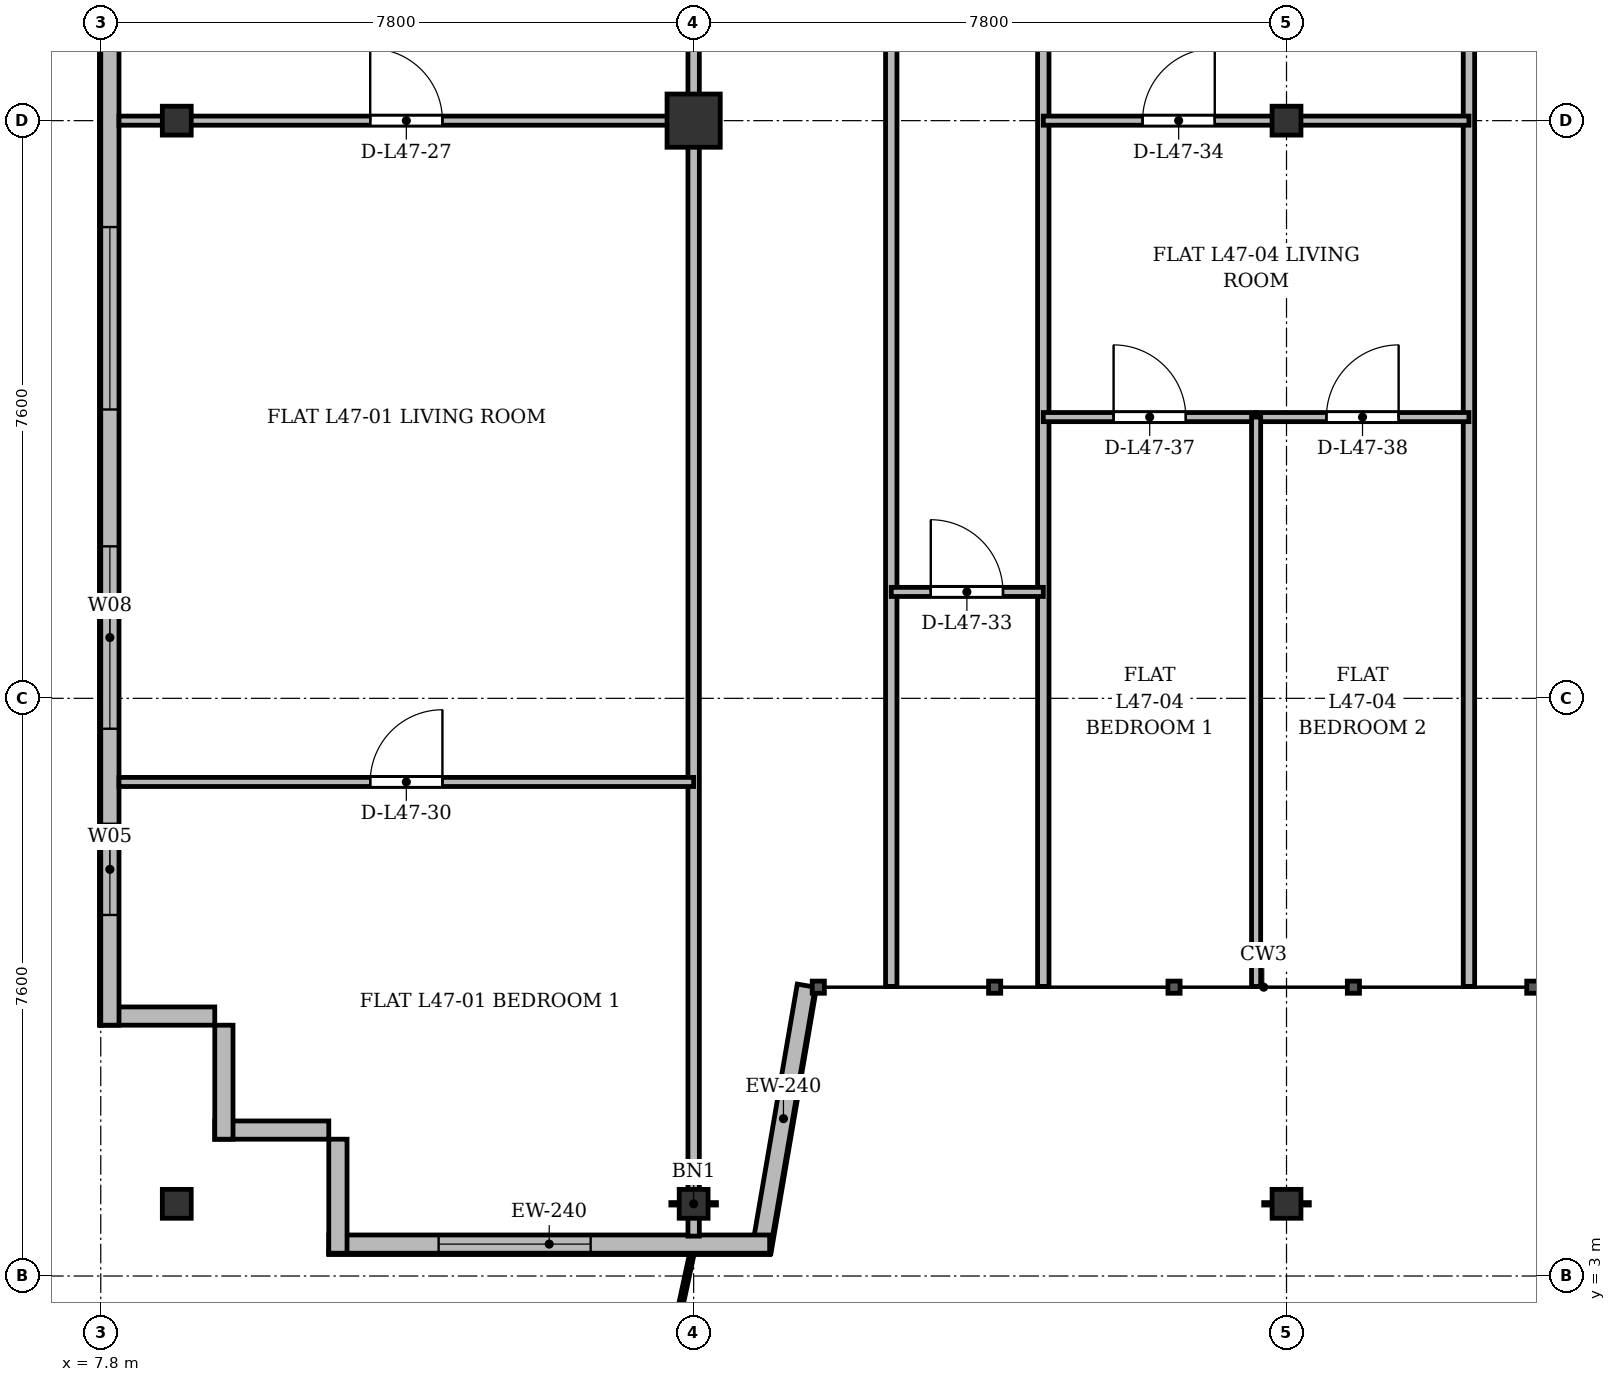
"""IFC4 building model, lengths in metres.
Left out: names, types, materials, properties, quantities, classifications, styles, units other than length and angle.
Written with IfcOpenShell. Run it as: python <this file> out.ifc"""

import sys

from ifc_helpers import new_model, si_unit, direction, frame, frame_2d, origin, origin_2d, place, context, subcontext, project, spatial, rectangle, i_section, extrude, source, transform, mapped, element, fill, save


model = new_model("IFC4")
c1 = context("Model", 3, precision=1e-05, world=origin(), true_north=direction((0.0, 1.0)))
c2 = subcontext(c1, "Body", "Model", "MODEL_VIEW")
j1 = project(units=[si_unit("LENGTHUNIT", "METRE"), si_unit("PLANEANGLEUNIT", "RADIAN")], contexts=[c1])
p1 = place(None, origin())
s1 = spatial("IfcSite", under=j1, at=p1, CompositionType="ELEMENT")
p2 = place(p1, origin())
s2 = spatial("IfcBuilding", under=s1, at=p2, CompositionType="ELEMENT")
p3 = place(p2, frame((0.0, 0.0, 178.9)))
s3 = spatial("IfcBuildingStorey", under=s2, at=p3, CompositionType="ELEMENT", Elevation=178.9)
m1 = source(origin(), c2, "Body", "SweptSolid", [
    extrude(i_section(OverallWidth=0.38, OverallDepth=0.38, WebThickness=0.02, FlangeThickness=0.03, at=origin_2d()), origin(), (0.0, 0.0, 1.0), 3.6),
])
for number, where, z_axis, x_axis in (
    (1, (8.8, 3.95, 0.0), (0.0, 0.0, 1.0), (1.0, 0.0, 0.0)),
    (2, (8.8, 18.2, 0.0), (0.0, 0.0, 1.0), (1.0, 0.0, 0.0)),
    (3, (15.6, 3.95, 0.0), (0.0, 0.0, 1.0), (1.0, 0.0, 0.0)),
):
    element("IfcColumn", number, at=place(p3, frame(where, z_axis=z_axis, x_axis=x_axis)), inside=s3, PredefinedType="COLUMN", context=c2, shape_type="MappedRepresentation", body=[
        mapped(m1, transform((0.0, 0.0, 0.0), x_axis=(1.0, 0.0, 0.0), y_axis=(0.0, 1.0, 0.0), z_axis=(0.0, 0.0, 1.0), scale=1.0)),
    ])
m2 = source(origin(), c2, "Body", "SweptSolid", [
    extrude(rectangle(XDim=0.7, YDim=0.7, at=origin_2d()), origin(), (0.0, 0.0, 1.0), 3.6),
])
p4 = place(p3, frame((15.6, 18.2, 0.0), z_axis=(0.0, 0.0, 1.0), x_axis=(1.0, 0.0, 0.0)))
e4 = element("IfcColumn", 4, at=p4, inside=s3, PredefinedType="COLUMN", context=c2, shape_type="MappedRepresentation", body=[
    mapped(m2, transform((0.0, 0.0, 0.0), x_axis=(1.0, 0.0, 0.0), y_axis=(0.0, 1.0, 0.0), z_axis=(0.0, 0.0, 1.0), scale=1.0)),
])
for number, where, z_axis, x_axis in (
    (5, (23.4, 3.95, 0.0), (0.0, 0.0, 1.0), (1.0, 0.0, 0.0)),
    (6, (23.4, 18.2, 0.0), (0.0, 0.0, 1.0), (1.0, 0.0, 0.0)),
):
    element("IfcColumn", number, at=place(p3, frame(where, z_axis=z_axis, x_axis=x_axis)), inside=s3, PredefinedType="COLUMN", context=c2, shape_type="MappedRepresentation", body=[
        mapped(m1, transform((0.0, 0.0, 0.0), x_axis=(1.0, 0.0, 0.0), y_axis=(0.0, 1.0, 0.0), z_axis=(0.0, 0.0, 1.0), scale=1.0)),
    ])
for number, where, z_axis, x_axis in (
    (7, (10.8, 4.92, 0.0), (0.0, 0.0, 1.0), (-1.0, 0.0, 0.0)),
    (8, (9.42, 4.8, 0.0), (0.0, 0.0, 1.0), (0.0, 1.0, 0.0)),
):
    element("IfcWall", number, at=place(p3, frame(where, z_axis=z_axis, x_axis=x_axis)), inside=s3, PredefinedType="SOLIDWALL", context=c2, shape_type="SweptSolid", body=[
        extrude(rectangle(XDim=1.5, YDim=0.24, at=frame_2d((0.75, 0.0))), origin(), (0.0, 0.0, 1.0), 3.22),
    ])
p5 = place(p3, frame((9.3, 6.42, 0.0), z_axis=(0.0, 0.0, 1.0), x_axis=(-1.0, 0.0, 0.0)))
e9 = element("IfcWall", 9, at=p5, inside=s3, PredefinedType="SOLIDWALL", context=c2, shape_type="SweptSolid", body=[
    extrude(rectangle(XDim=1.5, YDim=0.24, at=frame_2d((0.75, 0.0))), origin(), (0.0, 0.0, 1.0), 2.72),
])
p6 = place(p3, frame((7.92, 6.3, 0.0), z_axis=(0.0, 0.0, 1.0), x_axis=(0.0, 1.0, 0.0)))
e10 = element("IfcWall", 10, at=p6, inside=s3, PredefinedType="SOLIDWALL", context=c2, shape_type="SweptSolid", body=[
    extrude(rectangle(XDim=39.2, YDim=0.24, at=frame_2d((19.6, 0.0))), origin(), (0.0, 0.0, 1.0), 3.22),
])
p7 = place(p6, frame((1.45, 0.0, 0.92)))
e11 = element("IfcOpeningElement", 11, at=p7, cuts=e10, PredefinedType="OPENING", context=c2, shape_type="SweptSolid", body=[
    extrude(rectangle(XDim=1.2, YDim=1.65, at=frame_2d((0.6, 0.825))), frame((0.0, 0.13, 0.0), z_axis=(0.0, -1.0, 0.0), x_axis=(1.0, 0.0, 0.0)), (0.0, 0.0, 1.0), 0.26),
])
p8 = place(p6, frame((3.9, 0.0, 0.92)))
e12 = element("IfcOpeningElement", 12, at=p8, cuts=e10, PredefinedType="OPENING", context=c2, shape_type="SweptSolid", body=[
    extrude(rectangle(XDim=2.4, YDim=2.1, at=frame_2d((1.2, 1.05))), frame((0.0, 0.13, 0.0), z_axis=(0.0, -1.0, 0.0), x_axis=(1.0, 0.0, 0.0)), (0.0, 0.0, 1.0), 0.26),
])
p9 = place(p6, frame((8.1, 0.0, 0.92)))
e13 = element("IfcOpeningElement", 13, at=p9, cuts=e10, PredefinedType="OPENING", context=c2, shape_type="SweptSolid", body=[
    extrude(rectangle(XDim=2.4, YDim=2.1, at=frame_2d((1.2, 1.05))), frame((0.0, 0.13, 0.0), z_axis=(0.0, -1.0, 0.0), x_axis=(1.0, 0.0, 0.0)), (0.0, 0.0, 1.0), 0.26),
])
p10 = place(p6, frame((15.3, 0.0, 0.92)))
e14 = element("IfcOpeningElement", 14, at=p10, cuts=e10, PredefinedType="OPENING", context=c2, shape_type="SweptSolid", body=[
    extrude(rectangle(XDim=2.4, YDim=2.1, at=frame_2d((1.2, 1.05))), frame((0.0, 0.13, 0.0), z_axis=(0.0, -1.0, 0.0), x_axis=(1.0, 0.0, 0.0)), (0.0, 0.0, 1.0), 0.26),
])
p11 = place(p6, frame((33.5, 0.0, 0.92)))
e15 = element("IfcOpeningElement", 15, at=p11, cuts=e10, PredefinedType="OPENING", context=c2, shape_type="SweptSolid", body=[
    extrude(rectangle(XDim=1.2, YDim=1.65, at=frame_2d((0.6, 0.825))), frame((0.0, 0.13, 0.0), z_axis=(0.0, -1.0, 0.0), x_axis=(1.0, 0.0, 0.0)), (0.0, 0.0, 1.0), 0.26),
])
p12 = place(p6, frame((36.85, 0.0, 0.92)))
e16 = element("IfcOpeningElement", 16, at=p12, cuts=e10, PredefinedType="OPENING", context=c2, shape_type="SweptSolid", body=[
    extrude(rectangle(XDim=1.2, YDim=1.65, at=frame_2d((0.6, 0.825))), frame((0.0, 0.13, 0.0), z_axis=(0.0, -1.0, 0.0), x_axis=(1.0, 0.0, 0.0)), (0.0, 0.0, 1.0), 0.26),
])
p13 = place(p3, frame((17.082, 6.82, 0.0), z_axis=(0.0, 0.0, 1.0), x_axis=(-0.168990530437, -0.98561767467, 0.0)))
e17 = element("IfcWall", 17, at=p13, inside=s3, PredefinedType="SOLIDWALL", context=c2, shape_type="SweptSolid", body=[
    extrude(rectangle(XDim=3.551, YDim=0.24, at=frame_2d((1.775, 0.0))), origin(), (0.0, 0.0, 1.0), 2.62),
])
p14 = place(p3, frame((16.6, 3.42, 0.0), z_axis=(0.0, 0.0, 1.0), x_axis=(-1.0, 0.0, 0.0)))
e18 = element("IfcWall", 18, at=p14, inside=s3, PredefinedType="SOLIDWALL", context=c2, shape_type="SweptSolid", body=[
    extrude(rectangle(XDim=5.8, YDim=0.24, at=frame_2d((2.9, 0.0))), origin(), (0.0, 0.0, 1.0), 3.22),
])
p15 = place(p14, frame((2.355, 0.0, 0.9)))
e19 = element("IfcOpeningElement", 19, at=p15, cuts=e18, PredefinedType="OPENING", context=c2, shape_type="SweptSolid", body=[
    extrude(rectangle(XDim=2.0, YDim=1.95, at=frame_2d((1.0, 0.975))), frame((0.0, 0.13, 0.0), z_axis=(0.0, -1.0, 0.0), x_axis=(1.0, 0.0, 0.0)), (0.0, 0.0, 1.0), 0.26),
])
p16 = place(p3, frame((10.92, 3.3, 0.0), z_axis=(0.0, 0.0, 1.0), x_axis=(0.0, 1.0, 0.0)))
e20 = element("IfcWall", 20, at=p16, inside=s3, PredefinedType="SOLIDWALL", context=c2, shape_type="SweptSolid", body=[
    extrude(rectangle(XDim=1.5, YDim=0.24, at=frame_2d((0.75, 0.0))), origin(), (0.0, 0.0, 1.0), 2.62),
])
p17 = place(p3, frame((15.6, 3.525, 0.0), z_axis=(0.0, 0.0, 1.0), x_axis=(0.0, 1.0, 0.0)))
e21 = element("IfcWall", 21, at=p17, inside=s3, PredefinedType="PARTITIONING", context=c2, shape_type="SweptSolid", body=[
    extrude(rectangle(XDim=27.275, YDim=0.15, at=frame_2d((13.638, 0.0))), origin(), (0.0, 0.0, 1.0), 2.72),
])
p18 = place(p3, frame((25.8, 6.81, 0.0), z_axis=(0.0, 0.0, 1.0), x_axis=(0.0, 1.0, 0.0)))
e22 = element("IfcWall", 22, at=p18, inside=s3, PredefinedType="PARTITIONING", context=c2, shape_type="SweptSolid", body=[
    extrude(rectangle(XDim=23.99, YDim=0.15, at=frame_2d((11.995, 0.0))), origin(), (0.0, 0.0, 1.0), 2.62),
])
p19 = place(p3, frame((8.04, 18.2, 0.0), z_axis=(0.0, 0.0, 1.0), x_axis=(1.0, 0.0, 0.0)))
e23 = element("IfcWall", 23, at=p19, inside=s3, PredefinedType="PARTITIONING", context=c2, shape_type="SweptSolid", body=[
    extrude(rectangle(XDim=7.56, YDim=0.12, at=frame_2d((3.78, 0.0))), origin(), (0.0, 0.0, 1.0), 2.62),
])
p20 = place(p19, frame((3.305, 0.0, 0.0)))
e24 = element("IfcOpeningElement", 24, at=p20, cuts=e23, PredefinedType="OPENING", context=c2, shape_type="SweptSolid", body=[
    extrude(rectangle(XDim=0.95, YDim=2.15, at=frame_2d((0.475, 1.075))), frame((0.0, 0.07, 0.0), z_axis=(0.0, -1.0, 0.0), x_axis=(1.0, 0.0, 0.0)), (0.0, 0.0, 1.0), 0.14),
])
p21 = place(p3, frame((8.04, 9.5, 0.0), z_axis=(0.0, 0.0, 1.0), x_axis=(1.0, 0.0, 0.0)))
e25 = element("IfcWall", 25, at=p21, inside=s3, PredefinedType="PARTITIONING", context=c2, shape_type="SweptSolid", body=[
    extrude(rectangle(XDim=7.56, YDim=0.12, at=frame_2d((3.78, 0.0))), origin(), (0.0, 0.0, 1.0), 2.72),
])
p22 = place(p21, frame((3.305, 0.0, 0.0)))
e26 = element("IfcOpeningElement", 26, at=p22, cuts=e25, PredefinedType="OPENING", context=c2, shape_type="SweptSolid", body=[
    extrude(rectangle(XDim=0.95, YDim=2.15, at=frame_2d((0.475, 1.075))), frame((0.0, 0.07, 0.0), z_axis=(0.0, -1.0, 0.0), x_axis=(1.0, 0.0, 0.0)), (0.0, 0.0, 1.0), 0.14),
])
for number, where, z_axis, x_axis in (
    (27, (18.2, 6.81, 0.0), (0.0, 0.0, 1.0), (0.0, 1.0, 0.0)),
    (28, (20.2, 6.81, 0.0), (0.0, 0.0, 1.0), (0.0, 1.0, 0.0)),
):
    element("IfcWall", number, at=place(p3, frame(where, z_axis=z_axis, x_axis=x_axis)), inside=s3, PredefinedType="PARTITIONING", context=c2, shape_type="SweptSolid", body=[
        extrude(rectangle(XDim=23.99, YDim=0.15, at=frame_2d((11.995, 0.0))), origin(), (0.0, 0.0, 1.0), 2.62),
    ])
p23 = place(p3, frame((18.2, 12.0, 0.0), z_axis=(0.0, 0.0, 1.0), x_axis=(1.0, 0.0, 0.0)))
e29 = element("IfcWall", 29, at=p23, inside=s3, PredefinedType="PARTITIONING", context=c2, shape_type="SweptSolid", body=[
    extrude(rectangle(XDim=2.0, YDim=0.12, at=frame_2d((1.0, 0.0))), origin(), (0.0, 0.0, 1.0), 3.22),
])
p24 = place(p23, frame((0.52, 0.0, 0.0)))
e30 = element("IfcOpeningElement", 30, at=p24, cuts=e29, PredefinedType="OPENING", context=c2, shape_type="SweptSolid", body=[
    extrude(rectangle(XDim=0.95, YDim=2.15, at=frame_2d((0.475, 1.075))), frame((0.0, 0.07, 0.0), z_axis=(0.0, -1.0, 0.0), x_axis=(1.0, 0.0, 0.0)), (0.0, 0.0, 1.0), 0.14),
])
p25 = place(p3, frame((20.2, 18.2, 0.0), z_axis=(0.0, 0.0, 1.0), x_axis=(1.0, 0.0, 0.0)))
e31 = element("IfcWall", 31, at=p25, inside=s3, PredefinedType="PARTITIONING", context=c2, shape_type="SweptSolid", body=[
    extrude(rectangle(XDim=5.6, YDim=0.12, at=frame_2d((2.8, 0.0))), origin(), (0.0, 0.0, 1.0), 2.62),
])
p26 = place(p25, frame((1.306, 0.0, 0.0)))
e32 = element("IfcOpeningElement", 32, at=p26, cuts=e31, PredefinedType="OPENING", context=c2, shape_type="SweptSolid", body=[
    extrude(rectangle(XDim=0.95, YDim=2.15, at=frame_2d((0.475, 1.075))), frame((0.0, 0.07, 0.0), z_axis=(0.0, -1.0, 0.0), x_axis=(1.0, 0.0, 0.0)), (0.0, 0.0, 1.0), 0.14),
])
p27 = place(p3, frame((20.2, 14.3, 0.0), z_axis=(0.0, 0.0, 1.0), x_axis=(1.0, 0.0, 0.0)))
e33 = element("IfcWall", 33, at=p27, inside=s3, PredefinedType="PARTITIONING", context=c2, shape_type="SweptSolid", body=[
    extrude(rectangle(XDim=2.8, YDim=0.12, at=frame_2d((1.4, 0.0))), origin(), (0.0, 0.0, 1.0), 3.22),
])
p28 = place(p27, frame((0.925, 0.0, 0.0)))
e34 = element("IfcOpeningElement", 34, at=p28, cuts=e33, PredefinedType="OPENING", context=c2, shape_type="SweptSolid", body=[
    extrude(rectangle(XDim=0.95, YDim=2.15, at=frame_2d((0.475, 1.075))), frame((0.0, 0.07, 0.0), z_axis=(0.0, -1.0, 0.0), x_axis=(1.0, 0.0, 0.0)), (0.0, 0.0, 1.0), 0.14),
])
p29 = place(p3, frame((23.0, 14.3, 0.0), z_axis=(0.0, 0.0, 1.0), x_axis=(1.0, 0.0, 0.0)))
e35 = element("IfcWall", 35, at=p29, inside=s3, PredefinedType="PARTITIONING", context=c2, shape_type="SweptSolid", body=[
    extrude(rectangle(XDim=2.8, YDim=0.12, at=frame_2d((1.4, 0.0))), origin(), (0.0, 0.0, 1.0), 2.72),
])
p30 = place(p29, frame((0.925, 0.0, 0.0)))
e36 = element("IfcOpeningElement", 36, at=p30, cuts=e35, PredefinedType="OPENING", context=c2, shape_type="SweptSolid", body=[
    extrude(rectangle(XDim=0.95, YDim=2.15, at=frame_2d((0.475, 1.075))), frame((0.0, 0.07, 0.0), z_axis=(0.0, -1.0, 0.0), x_axis=(1.0, 0.0, 0.0)), (0.0, 0.0, 1.0), 0.14),
])
p31 = place(p3, frame((23.0, 6.81, 0.0), z_axis=(0.0, 0.0, 1.0), x_axis=(0.0, 1.0, 0.0)))
e37 = element("IfcWall", 37, at=p31, inside=s3, PredefinedType="PARTITIONING", context=c2, shape_type="SweptSolid", body=[
    extrude(rectangle(XDim=7.49, YDim=0.12, at=frame_2d((3.745, 0.0))), origin(), (0.0, 0.0, 1.0), 3.22),
])
m3 = source(origin(), c2, "Body", "SweptSolid", [
    extrude(rectangle(XDim=1.2, YDim=1.65, at=frame_2d((0.6, 0.825))), frame((0.0, 0.03, 0.0), z_axis=(0.0, -1.0, 0.0), x_axis=(1.0, 0.0, 0.0)), (0.0, 0.0, 1.0), 0.06),
])
p32 = place(p7, origin())
e38 = element("IfcWindow", 38, at=p32, inside=s3, PartitioningType="SINGLE_PANEL", PredefinedType="WINDOW", context=c2, shape_type="MappedRepresentation", body=[
    mapped(m3, transform((0.0, 0.0, 0.0), x_axis=(1.0, 0.0, 0.0), y_axis=(0.0, 1.0, 0.0), z_axis=(0.0, 0.0, 1.0), scale=1.0)),
])
fill(e11, e38)
m4 = source(origin(), c2, "Body", "SweptSolid", [
    extrude(rectangle(XDim=2.4, YDim=2.1, at=frame_2d((1.2, 1.05))), frame((0.0, 0.03, 0.0), z_axis=(0.0, -1.0, 0.0), x_axis=(1.0, 0.0, 0.0)), (0.0, 0.0, 1.0), 0.06),
])
p33 = place(p8, origin())
e39 = element("IfcWindow", 39, at=p33, inside=s3, PartitioningType="SINGLE_PANEL", PredefinedType="WINDOW", context=c2, shape_type="MappedRepresentation", body=[
    mapped(m4, transform((0.0, 0.0, 0.0), x_axis=(1.0, 0.0, 0.0), y_axis=(0.0, 1.0, 0.0), z_axis=(0.0, 0.0, 1.0), scale=1.0)),
])
fill(e12, e39)
p34 = place(p9, origin())
e40 = element("IfcWindow", 40, at=p34, inside=s3, PartitioningType="SINGLE_PANEL", PredefinedType="WINDOW", context=c2, shape_type="MappedRepresentation", body=[
    mapped(m4, transform((0.0, 0.0, 0.0), x_axis=(1.0, 0.0, 0.0), y_axis=(0.0, 1.0, 0.0), z_axis=(0.0, 0.0, 1.0), scale=1.0)),
])
fill(e13, e40)
m5 = source(origin(), c2, "Body", "SweptSolid", [
    extrude(rectangle(XDim=2.0, YDim=1.95, at=frame_2d((1.0, 0.975))), frame((0.0, 0.03, 0.0), z_axis=(0.0, -1.0, 0.0), x_axis=(1.0, 0.0, 0.0)), (0.0, 0.0, 1.0), 0.06),
])
p35 = place(p15, origin())
e41 = element("IfcWindow", 41, at=p35, inside=s3, PartitioningType="SINGLE_PANEL", PredefinedType="WINDOW", context=c2, shape_type="MappedRepresentation", body=[
    mapped(m5, transform((0.0, 0.0, 0.0), x_axis=(1.0, 0.0, 0.0), y_axis=(0.0, 1.0, 0.0), z_axis=(0.0, 0.0, 1.0), scale=1.0)),
])
fill(e19, e41)
m6 = source(origin(), c2, "Body", "SweptSolid", [
    extrude(rectangle(XDim=0.95, YDim=2.15, at=frame_2d((0.475, 1.075))), frame((0.0, 0.025, 0.0), z_axis=(0.0, -1.0, 0.0), x_axis=(1.0, 0.0, 0.0)), (0.0, 0.0, 1.0), 0.05),
])
p36 = place(p20, origin())
e42 = element("IfcDoor", 42, at=p36, inside=s3, OperationType="SINGLE_SWING_LEFT", PredefinedType="DOOR", context=c2, shape_type="MappedRepresentation", body=[
    mapped(m6, transform((0.0, 0.0, 0.0), x_axis=(1.0, 0.0, 0.0), y_axis=(0.0, 1.0, 0.0), z_axis=(0.0, 0.0, 1.0), scale=1.0)),
])
fill(e24, e42)
p37 = place(p22, origin())
e43 = element("IfcDoor", 43, at=p37, inside=s3, OperationType="SINGLE_SWING_RIGHT", PredefinedType="DOOR", context=c2, shape_type="MappedRepresentation", body=[
    mapped(m6, transform((0.0, 0.0, 0.0), x_axis=(1.0, 0.0, 0.0), y_axis=(0.0, 1.0, 0.0), z_axis=(0.0, 0.0, 1.0), scale=1.0)),
])
fill(e26, e43)
p38 = place(p24, origin())
e44 = element("IfcDoor", 44, at=p38, inside=s3, OperationType="SINGLE_SWING_LEFT", PredefinedType="DOOR", context=c2, shape_type="MappedRepresentation", body=[
    mapped(m6, transform((0.0, 0.0, 0.0), x_axis=(1.0, 0.0, 0.0), y_axis=(0.0, 1.0, 0.0), z_axis=(0.0, 0.0, 1.0), scale=1.0)),
])
fill(e30, e44)
p39 = place(p26, origin())
e45 = element("IfcDoor", 45, at=p39, inside=s3, OperationType="SINGLE_SWING_RIGHT", PredefinedType="DOOR", context=c2, shape_type="MappedRepresentation", body=[
    mapped(m6, transform((0.0, 0.0, 0.0), x_axis=(1.0, 0.0, 0.0), y_axis=(0.0, 1.0, 0.0), z_axis=(0.0, 0.0, 1.0), scale=1.0)),
])
fill(e32, e45)
p40 = place(p28, origin())
e46 = element("IfcDoor", 46, at=p40, inside=s3, OperationType="SINGLE_SWING_LEFT", PredefinedType="DOOR", context=c2, shape_type="MappedRepresentation", body=[
    mapped(m6, transform((0.0, 0.0, 0.0), x_axis=(1.0, 0.0, 0.0), y_axis=(0.0, 1.0, 0.0), z_axis=(0.0, 0.0, 1.0), scale=1.0)),
])
fill(e34, e46)
p41 = place(p30, origin())
e47 = element("IfcDoor", 47, at=p41, inside=s3, OperationType="SINGLE_SWING_RIGHT", PredefinedType="DOOR", context=c2, shape_type="MappedRepresentation", body=[
    mapped(m6, transform((0.0, 0.0, 0.0), x_axis=(1.0, 0.0, 0.0), y_axis=(0.0, 1.0, 0.0), z_axis=(0.0, 0.0, 1.0), scale=1.0)),
])
fill(e36, e47)
save(model, sys.argv[1])
